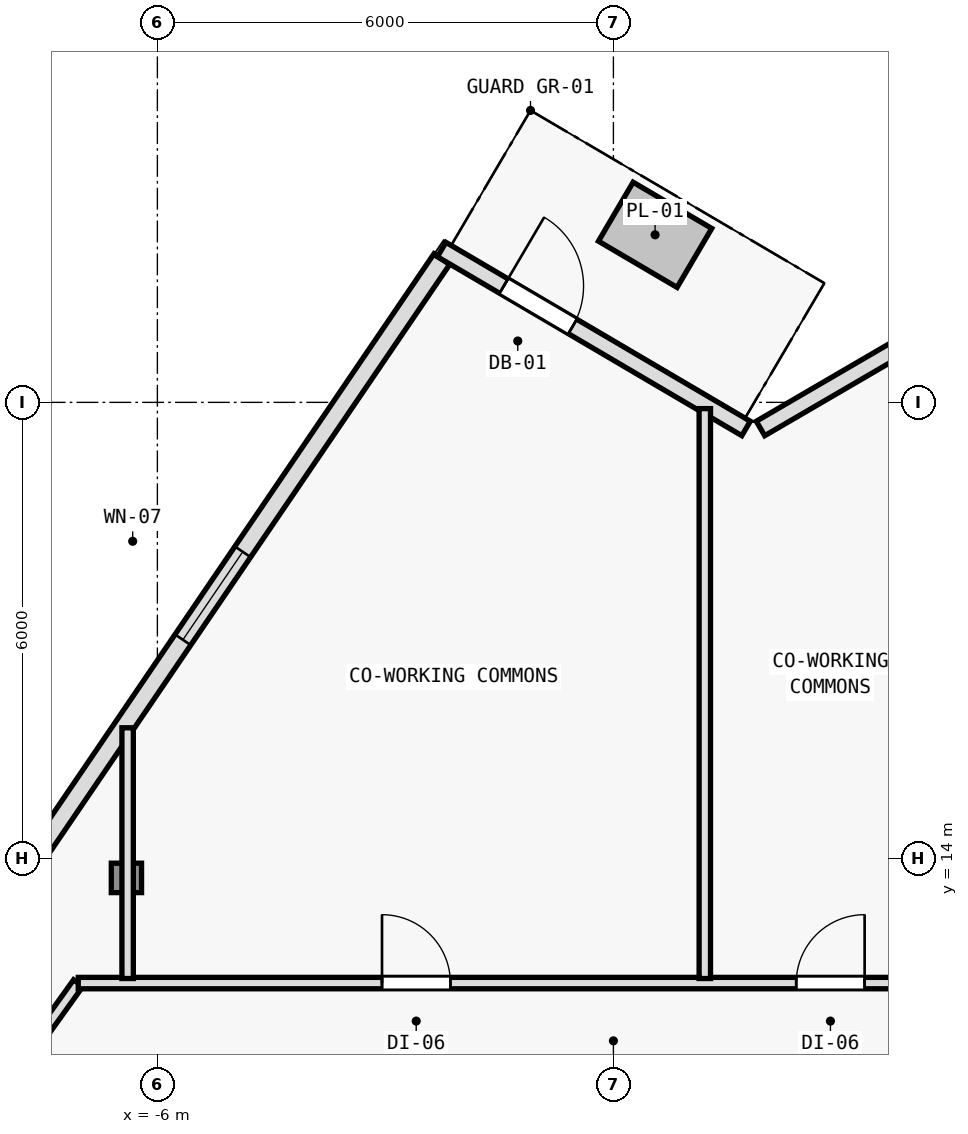
"""IFC4 building model, lengths in metres.
Left out: names, types, materials, properties, quantities, classifications, styles, units other than length and angle.
Written with IfcOpenShell. Run it as: python <this file> out.ifc"""

import sys

from ifc_helpers import new_model, si_unit, direction, frame, frame_2d, origin, origin_2d, place, context, subcontext, project, spatial, rectangle, i_section, extrude, element, fill, save


model = new_model("IFC4")
c1 = context("Model", 3, precision=1e-05, world=origin(), true_north=direction((0.0, 1.0)))
c2 = subcontext(c1, "Body", "Model", "MODEL_VIEW")
j1 = project(units=[si_unit("LENGTHUNIT", "METRE"), si_unit("PLANEANGLEUNIT", "RADIAN")], contexts=[c1])
p1 = place(None, origin())
s1 = spatial("IfcSite", under=j1, at=p1, CompositionType="ELEMENT")
p2 = place(p1, origin())
s2 = spatial("IfcBuilding", under=s1, at=p2, CompositionType="ELEMENT")
p3 = place(p2, frame((0.0, 0.0, 212.7)))
s3 = spatial("IfcBuildingStorey", under=s2, at=p3, CompositionType="ELEMENT", Elevation=212.7)
p4 = place(p3, frame((-6.407, 13.744, 0.006), z_axis=(0.008843163607, -0.002516900411, 0.999957730942), x_axis=(0.273743828055, 0.961802639112, 0.0)))
e1 = element("IfcColumn", 1, at=p4, inside=s3, PredefinedType="COLUMN", context=c2, shape_type="SweptSolid", body=[
    extrude(i_section(OverallWidth=0.398, OverallDepth=0.387, WebThickness=0.013, FlangeThickness=0.022, FilletRadius=0.015, at=origin_2d()), origin(), (0.0, 0.0, 1.0), 3.589),
])
p5 = place(p3, frame((-8.284, 13.026, 0.0), z_axis=(0.0, 0.0, 1.0), x_axis=(0.562468945091, 0.826818411629, 0.0)))
e2 = element("IfcWall", 2, at=p5, inside=s3, PredefinedType="SOLIDWALL", context=c2, shape_type="SweptSolid", body=[
    extrude(rectangle(XDim=10.714, YDim=0.25, at=frame_2d((5.357, 0.0))), origin(), (0.0, 0.0, 1.0), 3.35),
])
p6 = place(p5, frame((4.657, 0.0, 0.62)))
e3 = element("IfcOpeningElement", 3, at=p6, cuts=e2, PredefinedType="OPENING", context=c2, shape_type="SweptSolid", body=[
    extrude(rectangle(XDim=1.4, YDim=2.0, at=frame_2d((0.7, 1.0))), frame((0.0, 0.135, 0.0), z_axis=(0.0, -1.0, 0.0), x_axis=(1.0, 0.0, 0.0)), (0.0, 0.0, 1.0), 0.27),
])
p7 = place(p3, frame((1.935, 19.656, 0.0), z_axis=(0.0, 0.0, 1.0), x_axis=(0.863987356641, 0.503513502862, 0.0)))
e4 = element("IfcWall", 4, at=p7, inside=s3, PredefinedType="SOLIDWALL", context=c2, shape_type="SweptSolid", body=[
    extrude(rectangle(XDim=4.204, YDim=0.22, at=frame_2d((2.102, 0.0))), origin(), (0.0, 0.0, 1.0), 3.35),
])
p8 = place(p3, frame((-2.259, 22.01, 0.0), z_axis=(0.0, 0.0, 1.0), x_axis=(0.862123324624, -0.506698503193, 0.0)))
e5 = element("IfcWall", 5, at=p8, inside=s3, PredefinedType="SOLIDWALL", context=c2, shape_type="SweptSolid", body=[
    extrude(rectangle(XDim=4.645, YDim=0.22, at=frame_2d((2.322, 0.0))), origin(), (0.0, 0.0, 1.0), 3.35),
])
p9 = place(p8, frame((0.948, 0.0, 0.0)))
e6 = element("IfcOpeningElement", 6, at=p9, cuts=e5, PredefinedType="OPENING", context=c2, shape_type="SweptSolid", body=[
    extrude(rectangle(XDim=1.05, YDim=2.15, at=frame_2d((0.525, 1.075))), frame((0.0, 0.12, 0.0), z_axis=(0.0, -1.0, 0.0), x_axis=(1.0, 0.0, 0.0)), (0.0, 0.0, 1.0), 0.24),
])
p10 = place(p3, frame((-9.86, 8.426, 0.0), z_axis=(0.0, 0.0, 1.0), x_axis=(0.582449511476, 0.812866881218, 0.0)))
e7 = element("IfcWall", 7, at=p10, inside=s3, PredefinedType="PARTITIONING", context=c2, shape_type="SweptSolid", body=[
    extrude(rectangle(XDim=4.84, YDim=0.15, at=frame_2d((2.42, 0.0))), origin(), (0.0, 0.0, 1.0), 2.975),
])
p11 = place(p3, frame((-7.041, 12.36, 0.0), z_axis=(0.0, 0.0, 1.0), x_axis=(1.0, 0.0, 0.0)))
e8 = element("IfcWall", 8, at=p11, inside=s3, PredefinedType="PARTITIONING", context=c2, shape_type="SweptSolid", body=[
    extrude(rectangle(XDim=14.064, YDim=0.15, at=frame_2d((7.032, 0.0))), origin(), (0.0, 0.0, 1.0), 2.975),
])
p12 = place(p11, frame((12.268, 0.0, 0.0)))
e9 = element("IfcOpeningElement", 9, at=p12, cuts=e8, PredefinedType="OPENING", context=c2, shape_type="SweptSolid", body=[
    extrude(rectangle(XDim=0.9, YDim=2.1, at=frame_2d((0.45, 1.05))), frame((0.0, 0.085, 0.0), z_axis=(0.0, -1.0, 0.0), x_axis=(1.0, 0.0, 0.0)), (0.0, 0.0, 1.0), 0.17),
])
p13 = place(p11, frame((9.447, 0.0, 0.0)))
e10 = element("IfcOpeningElement", 10, at=p13, cuts=e8, PredefinedType="OPENING", context=c2, shape_type="SweptSolid", body=[
    extrude(rectangle(XDim=0.9, YDim=2.1, at=frame_2d((0.45, 1.05))), frame((0.0, 0.085, 0.0), z_axis=(0.0, -1.0, 0.0), x_axis=(1.0, 0.0, 0.0)), (0.0, 0.0, 1.0), 0.17),
])
p14 = place(p11, frame((3.997, 0.0, 0.0)))
e11 = element("IfcOpeningElement", 11, at=p14, cuts=e8, PredefinedType="OPENING", context=c2, shape_type="SweptSolid", body=[
    extrude(rectangle(XDim=0.9, YDim=2.1, at=frame_2d((0.45, 1.05))), frame((0.0, 0.085, 0.0), z_axis=(0.0, -1.0, 0.0), x_axis=(1.0, 0.0, 0.0)), (0.0, 0.0, 1.0), 0.17),
])
p15 = place(p3, frame((-6.391, 12.42, 0.0), z_axis=(0.0, 0.0, 1.0), x_axis=(0.0, 1.0, 0.0)))
e12 = element("IfcWall", 12, at=p15, inside=s3, PredefinedType="PARTITIONING", context=c2, shape_type="SweptSolid", body=[
    extrude(rectangle(XDim=3.299, YDim=0.15, at=frame_2d((1.649, 0.0))), origin(), (0.0, 0.0, 1.0), 2.975),
])
p16 = place(p3, frame((1.202, 12.42, 0.0), z_axis=(0.0, 0.0, 1.0), x_axis=(0.0, 1.0, 0.0)))
e13 = element("IfcWall", 13, at=p16, inside=s3, PredefinedType="PARTITIONING", context=c2, shape_type="SweptSolid", body=[
    extrude(rectangle(XDim=7.498, YDim=0.15, at=frame_2d((3.749, 0.0))), origin(), (0.0, 0.0, 1.0), 2.975),
])
p17 = place(p6, origin())
e14 = element("IfcWindow", 14, at=p17, inside=s3, PartitioningType="SINGLE_PANEL", PredefinedType="WINDOW", context=c2, shape_type="SweptSolid", body=[
    extrude(rectangle(XDim=1.4, YDim=2.0, at=frame_2d((0.7, 1.0))), frame((0.0, 0.03, 0.0), z_axis=(0.0, -1.0, 0.0), x_axis=(1.0, 0.0, 0.0)), (0.0, 0.0, 1.0), 0.06),
])
fill(e3, e14)
p18 = place(p9, origin())
e15 = element("IfcDoor", 15, at=p18, inside=s3, OperationType="SINGLE_SWING_LEFT", PredefinedType="DOOR", context=c2, shape_type="SweptSolid", body=[
    extrude(rectangle(XDim=1.05, YDim=2.15, at=frame_2d((0.525, 1.075))), frame((0.0, 0.025, 0.0), z_axis=(0.0, -1.0, 0.0), x_axis=(1.0, 0.0, 0.0)), (0.0, 0.0, 1.0), 0.05),
])
fill(e6, e15)
p19 = place(p13, origin())
e16 = element("IfcDoor", 16, at=p19, inside=s3, OperationType="SINGLE_SWING_RIGHT", PredefinedType="DOOR", context=c2, shape_type="SweptSolid", body=[
    extrude(rectangle(XDim=0.9, YDim=2.1, at=frame_2d((0.45, 1.05))), frame((0.0, 0.025, 0.0), z_axis=(0.0, -1.0, 0.0), x_axis=(1.0, 0.0, 0.0)), (0.0, 0.0, 1.0), 0.05),
])
fill(e10, e16)
p20 = place(p14, origin())
e17 = element("IfcDoor", 17, at=p20, inside=s3, OperationType="SINGLE_SWING_LEFT", PredefinedType="DOOR", context=c2, shape_type="SweptSolid", body=[
    extrude(rectangle(XDim=0.9, YDim=2.1, at=frame_2d((0.45, 1.05))), frame((0.0, 0.025, 0.0), z_axis=(0.0, -1.0, 0.0), x_axis=(1.0, 0.0, 0.0)), (0.0, 0.0, 1.0), 0.05),
])
fill(e11, e17)
save(model, sys.argv[1])
